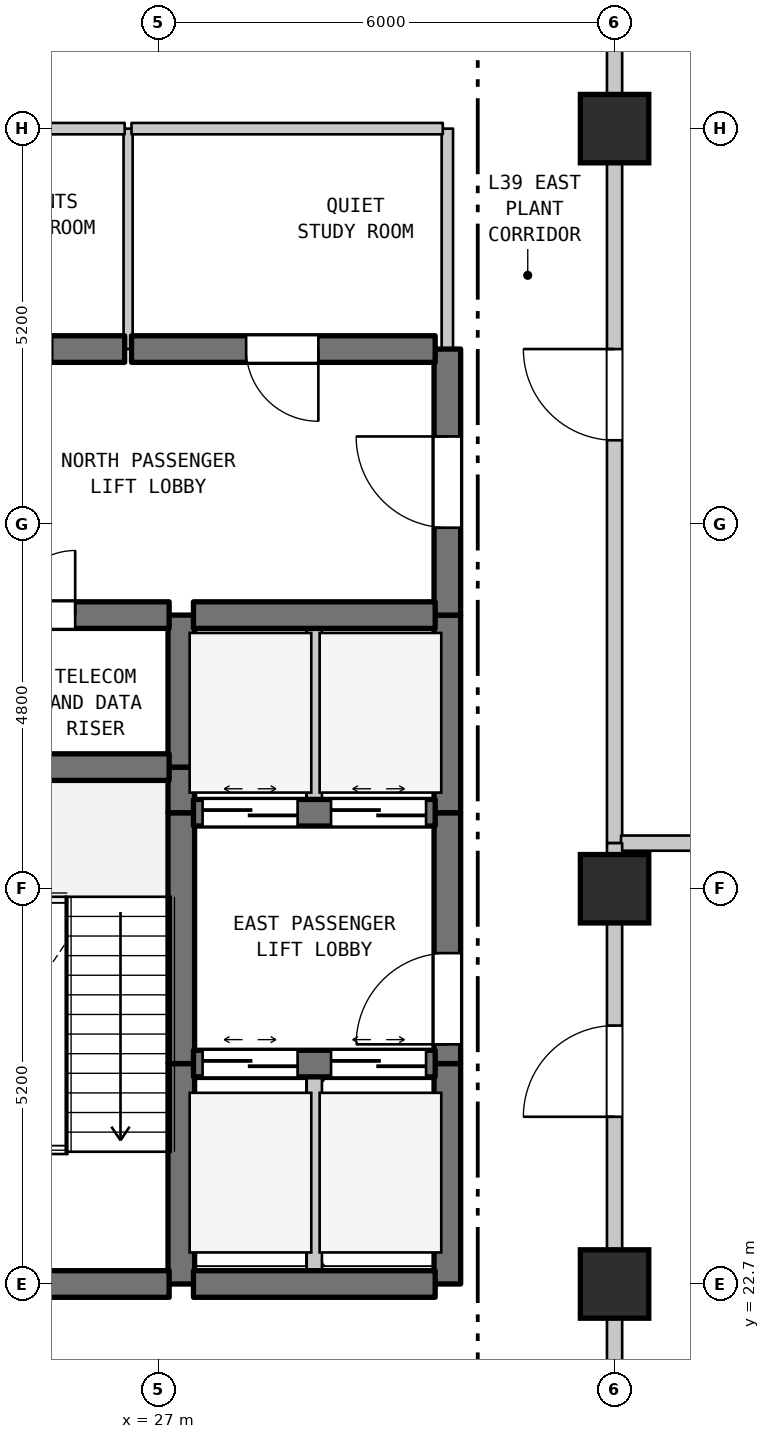
"""IFC4 building model, lengths in metres.
Left out: names, types, materials, properties, quantities, classifications, styles, units other than length and angle.
Written with IfcOpenShell. Run it as: python <this file> out.ifc"""

import sys

from ifc_helpers import new_model, si_unit, direction, frame, frame_2d, origin, origin_2d, place, context, subcontext, project, spatial, rectangle, extrude, element, fill, save


model = new_model("IFC4")
c1 = context("Model", 3, precision=1e-05, world=origin(), true_north=direction((0.0, 1.0)))
c2 = subcontext(c1, "Body", "Model", "MODEL_VIEW")
j1 = project(units=[si_unit("LENGTHUNIT", "METRE"), si_unit("PLANEANGLEUNIT", "RADIAN")], contexts=[c1])
p1 = place(None, origin())
s1 = spatial("IfcSite", under=j1, at=p1, CompositionType="ELEMENT")
p2 = place(p1, origin())
s2 = spatial("IfcBuilding", under=s1, at=p2, CompositionType="ELEMENT")
p3 = place(p2, frame((0.0, 0.0, 159.4)))
s3 = spatial("IfcBuildingStorey", under=s2, at=p3, CompositionType="ELEMENT", Elevation=159.4)
for number, where, z_axis, x_axis in (
    (1, (33.0, 22.7, 0.0), (0.0, 0.0, 1.0), (1.0, 0.0, 0.0)),
    (2, (33.0, 27.9, 0.0), (0.0, 0.0, 1.0), (1.0, 0.0, 0.0)),
    (3, (33.0, 37.9, 0.0), (0.0, 0.0, 1.0), (1.0, 0.0, 0.0)),
):
    element("IfcColumn", number, at=place(p3, frame(where, z_axis=z_axis, x_axis=x_axis)), inside=s3, PredefinedType="COLUMN", context=c2, shape_type="SweptSolid", body=[
        extrude(rectangle(XDim=0.9, YDim=0.9, at=origin_2d()), origin(), (0.0, 0.0, 1.0), 5.2),
    ])
p4 = place(p3, frame((26.6, 35.0, 0.0), z_axis=(0.0, 0.0, 1.0), x_axis=(0.0, 1.0, 0.0)))
e4 = element("IfcWall", 4, at=p4, inside=s3, PredefinedType="PARTITIONING", context=c2, shape_type="SweptSolid", body=[
    extrude(rectangle(XDim=2.9, YDim=0.12, at=frame_2d((1.45, 0.0))), origin(), (0.0, 0.0, 1.0), 4.89),
])
p5 = place(p3, frame((27.3, 22.7, 0.0), z_axis=(0.0, 0.0, 1.0), x_axis=(0.0, 1.0, 0.0)))
e5 = element("IfcWall", 5, at=p5, inside=s3, PredefinedType="SHEAR", context=c2, shape_type="SweptSolid", body=[
    extrude(rectangle(XDim=2.9, YDim=0.35, at=frame_2d((1.45, 0.0))), origin(), (0.0, 0.0, 1.0), 4.89),
])
p6 = place(p3, frame((27.3, 25.6, 0.0), z_axis=(0.0, 0.0, 1.0), x_axis=(0.0, 1.0, 0.0)))
e6 = element("IfcWall", 6, at=p6, inside=s3, PredefinedType="SHEAR", context=c2, shape_type="SweptSolid", body=[
    extrude(rectangle(XDim=3.3, YDim=0.35, at=frame_2d((1.65, 0.0))), origin(), (0.0, 0.0, 1.0), 4.89),
])
p7 = place(p3, frame((27.3, 28.9, 0.0), z_axis=(0.0, 0.0, 1.0), x_axis=(0.0, 1.0, 0.0)))
e7 = element("IfcWall", 7, at=p7, inside=s3, PredefinedType="SHEAR", context=c2, shape_type="SweptSolid", body=[
    extrude(rectangle(XDim=0.6, YDim=0.35, at=frame_2d((0.3, 0.0))), origin(), (0.0, 0.0, 1.0), 4.89),
])
p8 = place(p3, frame((27.3, 29.5, 0.0), z_axis=(0.0, 0.0, 1.0), x_axis=(0.0, 1.0, 0.0)))
e8 = element("IfcWall", 8, at=p8, inside=s3, PredefinedType="SHEAR", context=c2, shape_type="SweptSolid", body=[
    extrude(rectangle(XDim=2.0, YDim=0.35, at=frame_2d((1.0, 0.0))), origin(), (0.0, 0.0, 1.0), 4.89),
])
p9 = place(p3, frame((29.05, 22.7, 0.0), z_axis=(0.0, 0.0, 1.0), x_axis=(0.0, 1.0, 0.0)))
e9 = element("IfcWall", 9, at=p9, inside=s3, PredefinedType="STANDARD", context=c2, shape_type="SweptSolid", body=[
    extrude(rectangle(XDim=2.9, YDim=0.2, at=frame_2d((1.45, 0.0))), origin(), (0.0, 0.0, 1.0), 4.89),
])
p10 = place(p3, frame((29.05, 28.9, 0.0), z_axis=(0.0, 0.0, 1.0), x_axis=(0.0, 1.0, 0.0)))
e10 = element("IfcWall", 10, at=p10, inside=s3, PredefinedType="STANDARD", context=c2, shape_type="SweptSolid", body=[
    extrude(rectangle(XDim=2.6, YDim=0.2, at=frame_2d((1.3, 0.0))), origin(), (0.0, 0.0, 1.0), 4.89),
])
p11 = place(p3, frame((30.8, 22.7, 0.0), z_axis=(0.0, 0.0, 1.0), x_axis=(0.0, 1.0, 0.0)))
e11 = element("IfcWall", 11, at=p11, inside=s3, PredefinedType="SHEAR", context=c2, shape_type="SweptSolid", body=[
    extrude(rectangle(XDim=2.9, YDim=0.35, at=frame_2d((1.45, 0.0))), origin(), (0.0, 0.0, 1.0), 4.89),
])
p12 = place(p3, frame((30.8, 25.6, 0.0), z_axis=(0.0, 0.0, 1.0), x_axis=(0.0, 1.0, 0.0)))
e12 = element("IfcWall", 12, at=p12, inside=s3, PredefinedType="SHEAR", context=c2, shape_type="SweptSolid", body=[
    extrude(rectangle(XDim=3.3, YDim=0.35, at=frame_2d((1.65, 0.0))), origin(), (0.0, 0.0, 1.0), 4.89),
])
p13 = place(p12, frame((0.253, 0.0, 0.0)))
e13 = element("IfcOpeningElement", 13, at=p13, cuts=e12, PredefinedType="OPENING", context=c2, shape_type="SweptSolid", body=[
    extrude(rectangle(XDim=1.2, YDim=2.2, at=frame_2d((0.6, 1.1))), frame((0.0, 0.185, 0.0), z_axis=(0.0, -1.0, 0.0), x_axis=(1.0, 0.0, 0.0)), (0.0, 0.0, 1.0), 0.37),
])
p14 = place(p3, frame((30.8, 28.9, 0.0), z_axis=(0.0, 0.0, 1.0), x_axis=(0.0, 1.0, 0.0)))
e14 = element("IfcWall", 14, at=p14, inside=s3, PredefinedType="SHEAR", context=c2, shape_type="SweptSolid", body=[
    extrude(rectangle(XDim=2.6, YDim=0.35, at=frame_2d((1.3, 0.0))), origin(), (0.0, 0.0, 1.0), 4.89),
])
p15 = place(p3, frame((30.8, 31.5, 0.0), z_axis=(0.0, 0.0, 1.0), x_axis=(0.0, 1.0, 0.0)))
e15 = element("IfcWall", 15, at=p15, inside=s3, PredefinedType="SHEAR", context=c2, shape_type="SweptSolid", body=[
    extrude(rectangle(XDim=3.5, YDim=0.35, at=frame_2d((1.75, 0.0))), origin(), (0.0, 0.0, 1.0), 4.89),
])
p16 = place(p15, frame((1.15, 0.0, 0.0)))
e16 = element("IfcOpeningElement", 16, at=p16, cuts=e15, PredefinedType="OPENING", context=c2, shape_type="SweptSolid", body=[
    extrude(rectangle(XDim=1.2, YDim=2.2, at=frame_2d((0.6, 1.1))), frame((0.0, 0.185, 0.0), z_axis=(0.0, -1.0, 0.0), x_axis=(1.0, 0.0, 0.0)), (0.0, 0.0, 1.0), 0.37),
])
p17 = place(p3, frame((30.8, 35.0, 0.0), z_axis=(0.0, 0.0, 1.0), x_axis=(0.0, 1.0, 0.0)))
e17 = element("IfcWall", 17, at=p17, inside=s3, PredefinedType="STANDARD", context=c2, shape_type="SweptSolid", body=[
    extrude(rectangle(XDim=2.9, YDim=0.15, at=frame_2d((1.45, 0.0))), origin(), (0.0, 0.0, 1.0), 4.89),
])
p18 = place(p3, frame((33.0, 20.3, 0.0), z_axis=(0.0, 0.0, 1.0), x_axis=(0.0, 1.0, 0.0)))
e18 = element("IfcWall", 18, at=p18, inside=s3, PredefinedType="STANDARD", context=c2, shape_type="SweptSolid", body=[
    extrude(rectangle(XDim=7.6, YDim=0.2, at=frame_2d((3.8, 0.0))), origin(), (0.0, 0.0, 1.0), 4.49),
])
p19 = place(p18, frame((4.6, 0.0, 0.0)))
e19 = element("IfcOpeningElement", 19, at=p19, cuts=e18, PredefinedType="OPENING", context=c2, shape_type="SweptSolid", body=[
    extrude(rectangle(XDim=1.2, YDim=2.2, at=frame_2d((0.6, 1.1))), frame((0.0, 0.11, 0.0), z_axis=(0.0, -1.0, 0.0), x_axis=(1.0, 0.0, 0.0)), (0.0, 0.0, 1.0), 0.22),
])
p20 = place(p3, frame((33.0, 28.5, 0.0), z_axis=(0.0, 0.0, 1.0), x_axis=(0.0, 1.0, 0.0)))
e20 = element("IfcWall", 20, at=p20, inside=s3, PredefinedType="STANDARD", context=c2, shape_type="SweptSolid", body=[
    extrude(rectangle(XDim=9.4, YDim=0.2, at=frame_2d((4.7, 0.0))), origin(), (0.0, 0.0, 1.0), 4.39),
])
p21 = place(p20, frame((5.3, 0.0, 0.0)))
e21 = element("IfcOpeningElement", 21, at=p21, cuts=e20, PredefinedType="OPENING", context=c2, shape_type="SweptSolid", body=[
    extrude(rectangle(XDim=1.2, YDim=2.2, at=frame_2d((0.6, 1.1))), frame((0.0, 0.11, 0.0), z_axis=(0.0, -1.0, 0.0), x_axis=(1.0, 0.0, 0.0)), (0.0, 0.0, 1.0), 0.22),
])
for number, where, z_axis, x_axis in (
    (22, (23.96, 22.7, 0.0), (0.0, 0.0, 1.0), (1.0, 0.0, 0.0)),
    (23, (27.46, 22.7, 0.0), (0.0, 0.0, 1.0), (1.0, 0.0, 0.0)),
):
    element("IfcWall", number, at=place(p3, frame(where, z_axis=z_axis, x_axis=x_axis)), inside=s3, PredefinedType="SHEAR", context=c2, shape_type="SweptSolid", body=[
        extrude(rectangle(XDim=3.18, YDim=0.35, at=frame_2d((1.59, 0.0))), origin(), (0.0, 0.0, 1.0), 4.89),
    ])
p22 = place(p3, frame((27.46, 25.6, 0.0), z_axis=(0.0, 0.0, 1.0), x_axis=(1.0, 0.0, 0.0)))
e24 = element("IfcWall", 24, at=p22, inside=s3, PredefinedType="SHEAR", context=c2, shape_type="SweptSolid", body=[
    extrude(rectangle(XDim=3.18, YDim=0.35, at=frame_2d((1.59, 0.0))), origin(), (0.0, 0.0, 1.0), 4.89),
])
p23 = place(p22, frame((0.12, 0.0, 0.0)))
e25 = element("IfcOpeningElement", 25, at=p23, cuts=e24, PredefinedType="OPENING", context=c2, shape_type="SweptSolid", body=[
    extrude(rectangle(XDim=1.25, YDim=2.2, at=frame_2d((0.625, 1.1))), frame((0.0, 0.185, 0.0), z_axis=(0.0, -1.0, 0.0), x_axis=(1.0, 0.0, 0.0)), (0.0, 0.0, 1.0), 0.37),
])
p24 = place(p22, frame((1.81, 0.0, 0.0)))
e26 = element("IfcOpeningElement", 26, at=p24, cuts=e24, PredefinedType="OPENING", context=c2, shape_type="SweptSolid", body=[
    extrude(rectangle(XDim=1.25, YDim=2.2, at=frame_2d((0.625, 1.1))), frame((0.0, 0.185, 0.0), z_axis=(0.0, -1.0, 0.0), x_axis=(1.0, 0.0, 0.0)), (0.0, 0.0, 1.0), 0.37),
])
p25 = place(p3, frame((33.085, 28.5, 0.0), z_axis=(0.0, 0.0, 1.0), x_axis=(1.0, 0.0, 0.0)))
e27 = element("IfcWall", 27, at=p25, inside=s3, PredefinedType="STANDARD", context=c2, shape_type="SweptSolid", body=[
    extrude(rectangle(XDim=24.265, YDim=0.2, at=frame_2d((12.133, 0.0))), origin(), (0.0, 0.0, 1.0), 4.89),
])
p26 = place(p3, frame((27.46, 28.9, 0.0), z_axis=(0.0, 0.0, 1.0), x_axis=(1.0, 0.0, 0.0)))
e28 = element("IfcWall", 28, at=p26, inside=s3, PredefinedType="SHEAR", context=c2, shape_type="SweptSolid", body=[
    extrude(rectangle(XDim=3.18, YDim=0.35, at=frame_2d((1.59, 0.0))), origin(), (0.0, 0.0, 1.0), 4.89),
])
p27 = place(p26, frame((0.12, 0.0, 0.0)))
e29 = element("IfcOpeningElement", 29, at=p27, cuts=e28, PredefinedType="OPENING", context=c2, shape_type="SweptSolid", body=[
    extrude(rectangle(XDim=1.25, YDim=2.2, at=frame_2d((0.625, 1.1))), frame((0.0, 0.185, 0.0), z_axis=(0.0, -1.0, 0.0), x_axis=(1.0, 0.0, 0.0)), (0.0, 0.0, 1.0), 0.37),
])
p28 = place(p26, frame((1.81, 0.0, 0.0)))
e30 = element("IfcOpeningElement", 30, at=p28, cuts=e28, PredefinedType="OPENING", context=c2, shape_type="SweptSolid", body=[
    extrude(rectangle(XDim=1.25, YDim=2.2, at=frame_2d((0.625, 1.1))), frame((0.0, 0.185, 0.0), z_axis=(0.0, -1.0, 0.0), x_axis=(1.0, 0.0, 0.0)), (0.0, 0.0, 1.0), 0.37),
])
p29 = place(p3, frame((23.96, 29.5, 0.0), z_axis=(0.0, 0.0, 1.0), x_axis=(1.0, 0.0, 0.0)))
e31 = element("IfcWall", 31, at=p29, inside=s3, PredefinedType="SHEAR", context=c2, shape_type="SweptSolid", body=[
    extrude(rectangle(XDim=3.18, YDim=0.35, at=frame_2d((1.59, 0.0))), origin(), (0.0, 0.0, 1.0), 4.89),
])
p30 = place(p3, frame((23.96, 31.5, 0.0), z_axis=(0.0, 0.0, 1.0), x_axis=(1.0, 0.0, 0.0)))
e32 = element("IfcWall", 32, at=p30, inside=s3, PredefinedType="SHEAR", context=c2, shape_type="SweptSolid", body=[
    extrude(rectangle(XDim=3.18, YDim=0.35, at=frame_2d((1.59, 0.0))), origin(), (0.0, 0.0, 1.0), 4.89),
])
p31 = place(p30, frame((1.094, 0.0, 0.0)))
e33 = element("IfcOpeningElement", 33, at=p31, cuts=e32, PredefinedType="OPENING", context=c2, shape_type="SweptSolid", body=[
    extrude(rectangle(XDim=0.85, YDim=2.1, at=frame_2d((0.425, 1.05))), frame((0.0, 0.185, 0.0), z_axis=(0.0, -1.0, 0.0), x_axis=(1.0, 0.0, 0.0)), (0.0, 0.0, 1.0), 0.37),
])
p32 = place(p3, frame((27.46, 31.5, 0.0), z_axis=(0.0, 0.0, 1.0), x_axis=(1.0, 0.0, 0.0)))
e34 = element("IfcWall", 34, at=p32, inside=s3, PredefinedType="SHEAR", context=c2, shape_type="SweptSolid", body=[
    extrude(rectangle(XDim=3.18, YDim=0.35, at=frame_2d((1.59, 0.0))), origin(), (0.0, 0.0, 1.0), 4.89),
])
p33 = place(p3, frame((23.96, 35.0, 0.0), z_axis=(0.0, 0.0, 1.0), x_axis=(1.0, 0.0, 0.0)))
e35 = element("IfcWall", 35, at=p33, inside=s3, PredefinedType="SHEAR", context=c2, shape_type="SweptSolid", body=[
    extrude(rectangle(XDim=2.595, YDim=0.35, at=frame_2d((1.297, 0.0))), origin(), (0.0, 0.0, 1.0), 4.89),
])
p34 = place(p33, frame((0.691, 0.0, 0.0)))
e36 = element("IfcOpeningElement", 36, at=p34, cuts=e35, PredefinedType="OPENING", context=c2, shape_type="SweptSolid", body=[
    extrude(rectangle(XDim=0.95, YDim=2.15, at=frame_2d((0.475, 1.075))), frame((0.0, 0.185, 0.0), z_axis=(0.0, -1.0, 0.0), x_axis=(1.0, 0.0, 0.0)), (0.0, 0.0, 1.0), 0.37),
])
p35 = place(p3, frame((26.645, 35.0, 0.0), z_axis=(0.0, 0.0, 1.0), x_axis=(1.0, 0.0, 0.0)))
e37 = element("IfcWall", 37, at=p35, inside=s3, PredefinedType="SHEAR", context=c2, shape_type="SweptSolid", body=[
    extrude(rectangle(XDim=3.995, YDim=0.35, at=frame_2d((1.998, 0.0))), origin(), (0.0, 0.0, 1.0), 4.89),
])
p36 = place(p35, frame((1.508, 0.0, 0.0)))
e38 = element("IfcOpeningElement", 38, at=p36, cuts=e37, PredefinedType="OPENING", context=c2, shape_type="SweptSolid", body=[
    extrude(rectangle(XDim=0.95, YDim=2.15, at=frame_2d((0.475, 1.075))), frame((0.0, 0.185, 0.0), z_axis=(0.0, -1.0, 0.0), x_axis=(1.0, 0.0, 0.0)), (0.0, 0.0, 1.0), 0.37),
])
p37 = place(p3, frame((23.96, 37.9, 0.0), z_axis=(0.0, 0.0, 1.0), x_axis=(1.0, 0.0, 0.0)))
e39 = element("IfcWall", 39, at=p37, inside=s3, PredefinedType="STANDARD", context=c2, shape_type="SweptSolid", body=[
    extrude(rectangle(XDim=2.595, YDim=0.15, at=frame_2d((1.297, 0.0))), origin(), (0.0, 0.0, 1.0), 4.39),
])
p38 = place(p3, frame((26.645, 37.9, 0.0), z_axis=(0.0, 0.0, 1.0), x_axis=(1.0, 0.0, 0.0)))
e40 = element("IfcWall", 40, at=p38, inside=s3, PredefinedType="STANDARD", context=c2, shape_type="SweptSolid", body=[
    extrude(rectangle(XDim=4.095, YDim=0.15, at=frame_2d((2.047, 0.0))), origin(), (0.0, 0.0, 1.0), 4.39),
])
p39 = place(p3, frame((33.0, 27.9, 0.0), z_axis=(0.0, 0.0, 1.0), x_axis=(0.0, 1.0, 0.0)))
e41 = element("IfcWall", 41, at=p39, inside=s3, PredefinedType="STANDARD", context=c2, shape_type="SweptSolid", body=[
    extrude(rectangle(XDim=0.6, YDim=0.2, at=frame_2d((0.3, 0.0))), origin(), (0.0, 0.0, 1.0), 4.39),
])
p40 = place(p3, frame((33.0, 37.9, 0.0), z_axis=(0.0, 0.0, 1.0), x_axis=(0.0, 1.0, 0.0)))
e42 = element("IfcWall", 42, at=p40, inside=s3, PredefinedType="STANDARD", context=c2, shape_type="SweptSolid", body=[
    extrude(rectangle(XDim=2.4, YDim=0.2, at=frame_2d((1.2, 0.0))), origin(), (0.0, 0.0, 1.0), 4.29),
])
p41 = place(p13, origin())
e43 = element("IfcDoor", 43, at=p41, inside=s3, OperationType="SINGLE_SWING_LEFT", PredefinedType="DOOR", context=c2, shape_type="SweptSolid", body=[
    extrude(rectangle(XDim=1.2, YDim=2.2, at=frame_2d((0.6, 1.1))), frame((0.0, 0.025, 0.0), z_axis=(0.0, -1.0, 0.0), x_axis=(1.0, 0.0, 0.0)), (0.0, 0.0, 1.0), 0.05),
])
fill(e13, e43)
p42 = place(p16, origin())
e44 = element("IfcDoor", 44, at=p42, inside=s3, OperationType="SINGLE_SWING_RIGHT", PredefinedType="DOOR", context=c2, shape_type="SweptSolid", body=[
    extrude(rectangle(XDim=1.2, YDim=2.2, at=frame_2d((0.6, 1.1))), frame((0.0, 0.025, 0.0), z_axis=(0.0, -1.0, 0.0), x_axis=(1.0, 0.0, 0.0)), (0.0, 0.0, 1.0), 0.05),
])
fill(e16, e44)
p43 = place(p19, origin())
e45 = element("IfcDoor", 45, at=p43, inside=s3, OperationType="SINGLE_SWING_LEFT", PredefinedType="DOOR", context=c2, shape_type="SweptSolid", body=[
    extrude(rectangle(XDim=1.2, YDim=2.2, at=frame_2d((0.6, 1.1))), frame((0.0, 0.025, 0.0), z_axis=(0.0, -1.0, 0.0), x_axis=(1.0, 0.0, 0.0)), (0.0, 0.0, 1.0), 0.05),
])
fill(e19, e45)
p44 = place(p21, origin())
e46 = element("IfcDoor", 46, at=p44, inside=s3, OperationType="SINGLE_SWING_RIGHT", PredefinedType="DOOR", context=c2, shape_type="SweptSolid", body=[
    extrude(rectangle(XDim=1.2, YDim=2.2, at=frame_2d((0.6, 1.1))), frame((0.0, 0.025, 0.0), z_axis=(0.0, -1.0, 0.0), x_axis=(1.0, 0.0, 0.0)), (0.0, 0.0, 1.0), 0.05),
])
fill(e21, e46)
p45 = place(p23, origin())
e47 = element("IfcDoor", 47, at=p45, inside=s3, OperationType="DOUBLE_DOOR_SLIDING", PredefinedType="DOOR", context=c2, shape_type="SweptSolid", body=[
    extrude(rectangle(XDim=1.25, YDim=2.2, at=frame_2d((0.625, 1.1))), frame((0.0, 0.025, 0.0), z_axis=(0.0, -1.0, 0.0), x_axis=(1.0, 0.0, 0.0)), (0.0, 0.0, 1.0), 0.05),
])
fill(e25, e47)
p46 = place(p24, origin())
e48 = element("IfcDoor", 48, at=p46, inside=s3, OperationType="DOUBLE_DOOR_SLIDING", PredefinedType="DOOR", context=c2, shape_type="SweptSolid", body=[
    extrude(rectangle(XDim=1.25, YDim=2.2, at=frame_2d((0.625, 1.1))), frame((0.0, 0.025, 0.0), z_axis=(0.0, -1.0, 0.0), x_axis=(1.0, 0.0, 0.0)), (0.0, 0.0, 1.0), 0.05),
])
fill(e26, e48)
p47 = place(p27, origin())
e49 = element("IfcDoor", 49, at=p47, inside=s3, OperationType="DOUBLE_DOOR_SLIDING", PredefinedType="DOOR", context=c2, shape_type="SweptSolid", body=[
    extrude(rectangle(XDim=1.25, YDim=2.2, at=frame_2d((0.625, 1.1))), frame((0.0, 0.025, 0.0), z_axis=(0.0, -1.0, 0.0), x_axis=(1.0, 0.0, 0.0)), (0.0, 0.0, 1.0), 0.05),
])
fill(e29, e49)
p48 = place(p28, origin())
e50 = element("IfcDoor", 50, at=p48, inside=s3, OperationType="DOUBLE_DOOR_SLIDING", PredefinedType="DOOR", context=c2, shape_type="SweptSolid", body=[
    extrude(rectangle(XDim=1.25, YDim=2.2, at=frame_2d((0.625, 1.1))), frame((0.0, 0.025, 0.0), z_axis=(0.0, -1.0, 0.0), x_axis=(1.0, 0.0, 0.0)), (0.0, 0.0, 1.0), 0.05),
])
fill(e30, e50)
p49 = place(p31, origin())
e51 = element("IfcDoor", 51, at=p49, inside=s3, OperationType="SINGLE_SWING_RIGHT", PredefinedType="DOOR", context=c2, shape_type="SweptSolid", body=[
    extrude(rectangle(XDim=0.85, YDim=2.1, at=frame_2d((0.425, 1.05))), frame((0.0, 0.025, 0.0), z_axis=(0.0, -1.0, 0.0), x_axis=(1.0, 0.0, 0.0)), (0.0, 0.0, 1.0), 0.05),
])
fill(e33, e51)
p50 = place(p34, frame((0.95, 0.0, 0.0), z_axis=(0.0, 0.0, 1.0), x_axis=(-1.0, 0.0, 0.0)))
e52 = element("IfcDoor", 52, at=p50, inside=s3, OperationType="SINGLE_SWING_LEFT", PredefinedType="DOOR", context=c2, shape_type="SweptSolid", body=[
    extrude(rectangle(XDim=0.95, YDim=2.15, at=frame_2d((0.475, 1.075))), frame((0.0, 0.025, 0.0), z_axis=(0.0, -1.0, 0.0), x_axis=(1.0, 0.0, 0.0)), (0.0, 0.0, 1.0), 0.05),
])
fill(e36, e52)
p51 = place(p36, frame((0.95, 0.0, 0.0), z_axis=(0.0, 0.0, 1.0), x_axis=(-1.0, 0.0, 0.0)))
e53 = element("IfcDoor", 53, at=p51, inside=s3, OperationType="SINGLE_SWING_RIGHT", PredefinedType="DOOR", context=c2, shape_type="SweptSolid", body=[
    extrude(rectangle(XDim=0.95, YDim=2.15, at=frame_2d((0.475, 1.075))), frame((0.0, 0.025, 0.0), z_axis=(0.0, -1.0, 0.0), x_axis=(1.0, 0.0, 0.0)), (0.0, 0.0, 1.0), 0.05),
])
fill(e38, e53)
save(model, sys.argv[1])
